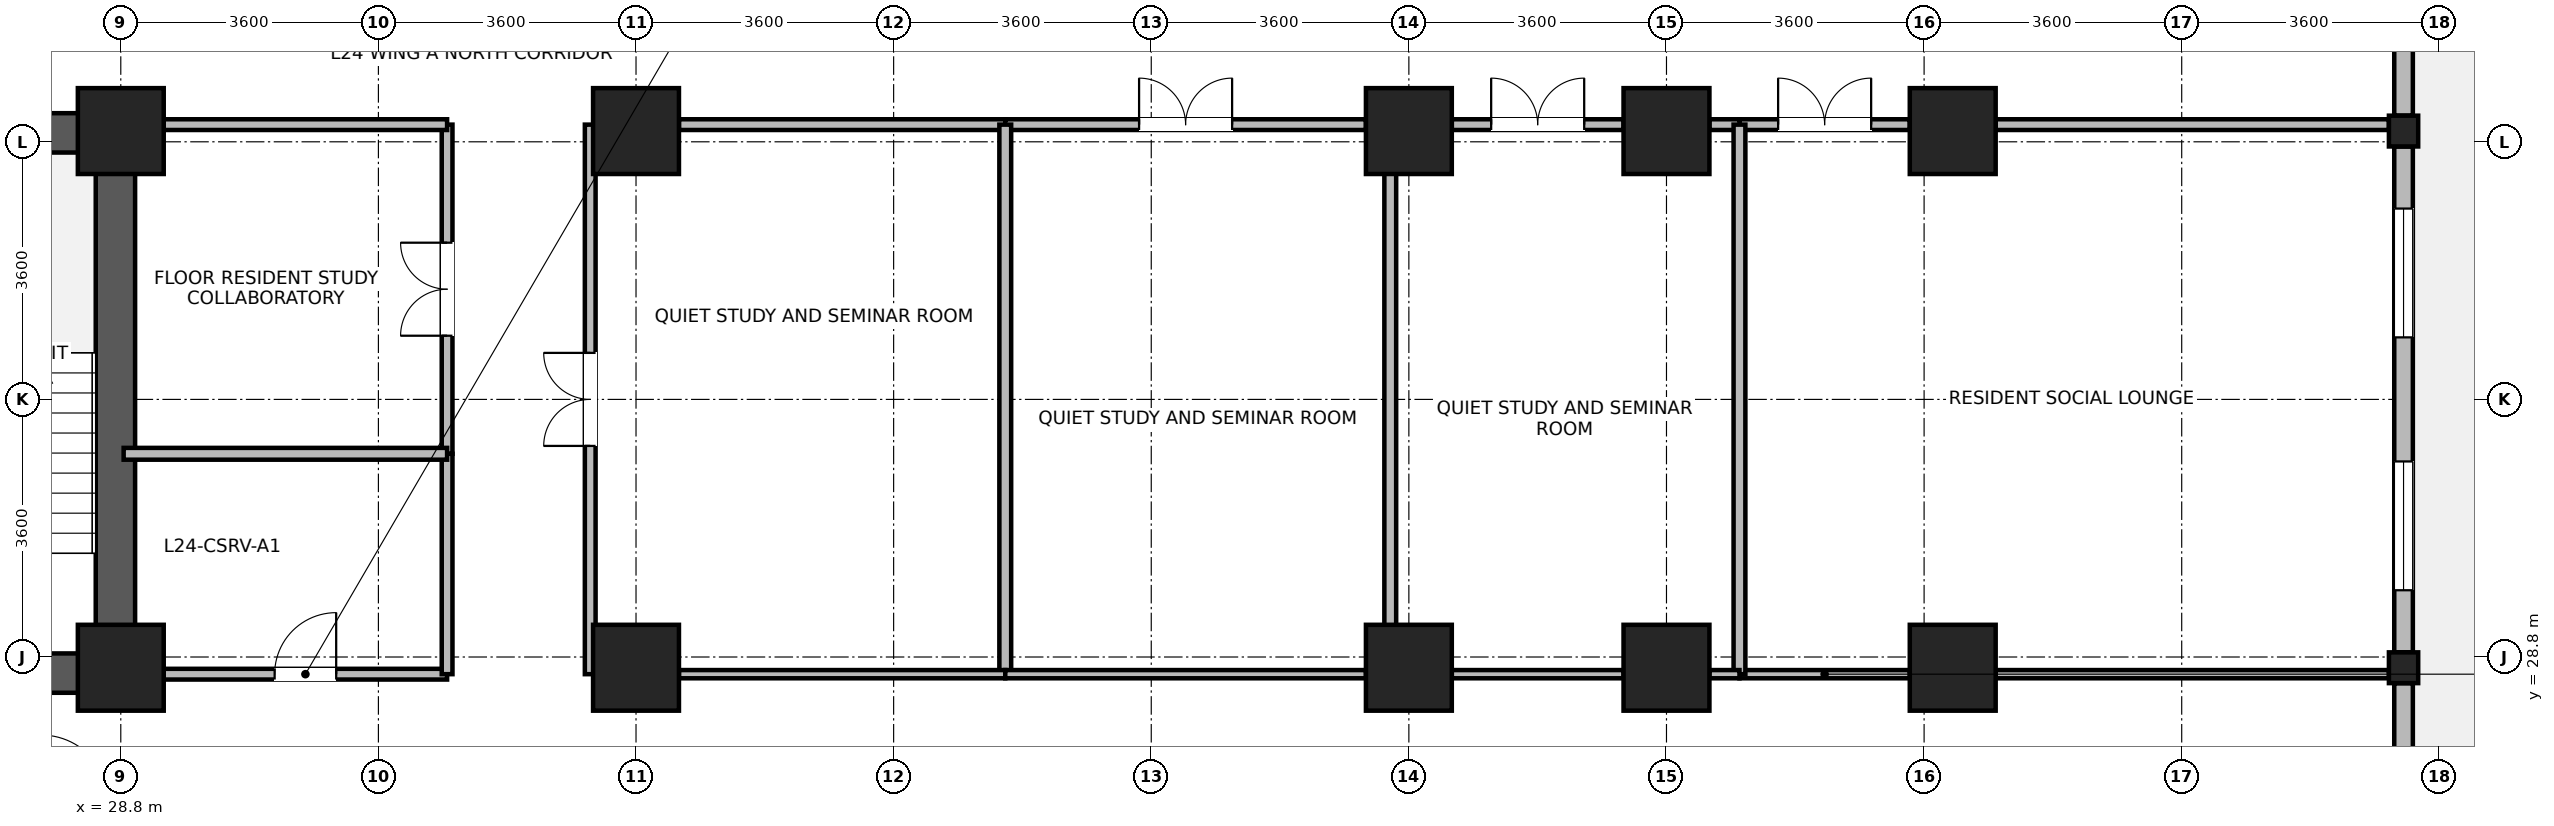
"""IFC4 building model, lengths in metres.
Left out: names, types, materials, properties, quantities, classifications, styles, units other than length and angle.
Written with IfcOpenShell. Run it as: python <this file> out.ifc"""

import sys

from ifc_helpers import new_model, si_unit, direction, frame, frame_2d, origin, origin_2d, place, context, subcontext, project, spatial, rectangle, i_section, extrude, source, transform, mapped, element, fill, save


model = new_model("IFC4")
c1 = context("Model", 3, precision=1e-05, world=origin(), true_north=direction((0.0, 1.0)))
c2 = subcontext(c1, "Body", "Model", "MODEL_VIEW")
j1 = project(units=[si_unit("LENGTHUNIT", "METRE"), si_unit("PLANEANGLEUNIT", "RADIAN")], contexts=[c1])
p1 = place(None, origin())
s1 = spatial("IfcSite", under=j1, at=p1, CompositionType="ELEMENT")
p2 = place(p1, origin())
s2 = spatial("IfcBuilding", under=s1, at=p2, CompositionType="ELEMENT")
p3 = place(p2, frame((0.0, 0.0, 97.1)))
s3 = spatial("IfcBuildingStorey", under=s2, at=p3, CompositionType="ELEMENT", Elevation=97.1)
p4 = place(p3, frame((28.725, 28.3, 0.0), z_axis=(0.0, 0.0, 1.0), x_axis=(0.0, 1.0, 0.0)))
e1 = element("IfcWall", 1, at=p4, inside=s3, PredefinedType="SHEAR", context=c2, shape_type="SweptSolid", body=[
    extrude(rectangle(XDim=8.1, YDim=0.55, at=frame_2d((4.05, 0.0))), origin(), (0.0, 0.0, 1.0), 3.45),
])
for number, where, z_axis, x_axis in (
    (2, (25.25, 28.575, 0.0), (0.0, 0.0, 1.0), (1.0, 0.0, 0.0)),
    (3, (25.25, 36.125, 0.0), (0.0, 0.0, 1.0), (1.0, 0.0, 0.0)),
):
    element("IfcWall", number, at=place(p3, frame(where, z_axis=z_axis, x_axis=x_axis)), inside=s3, PredefinedType="SHEAR", context=c2, shape_type="SweptSolid", body=[
        extrude(rectangle(XDim=3.2, YDim=0.55, at=frame_2d((1.6, 0.0))), origin(), (0.0, 0.0, 1.0), 3.45),
    ])
m1 = source(origin(), c2, "Body", "SweptSolid", [
    extrude(rectangle(XDim=1.2, YDim=1.2, at=origin_2d()), origin(), (0.0, 0.0, 1.0), 3.7),
])
for number, where, z_axis, x_axis in (
    (4, (28.8, 28.65, 0.0), (0.0, 0.0, 1.0), (1.0, 0.0, 0.0)),
    (5, (28.8, 36.15, 0.0), (0.0, 0.0, 1.0), (1.0, 0.0, 0.0)),
    (6, (36.0, 28.65, 0.0), (0.0, 0.0, 1.0), (1.0, 0.0, 0.0)),
    (7, (36.0, 36.15, 0.0), (0.0, 0.0, 1.0), (1.0, 0.0, 0.0)),
    (8, (46.8, 28.65, 0.0), (0.0, 0.0, 1.0), (1.0, 0.0, 0.0)),
    (9, (46.8, 36.15, 0.0), (0.0, 0.0, 1.0), (1.0, 0.0, 0.0)),
    (10, (50.4, 28.65, 0.0), (0.0, 0.0, 1.0), (1.0, 0.0, 0.0)),
    (11, (50.4, 36.15, 0.0), (0.0, 0.0, 1.0), (1.0, 0.0, 0.0)),
    (12, (54.4, 28.65, 0.0), (0.0, 0.0, 1.0), (1.0, 0.0, 0.0)),
    (13, (54.4, 36.15, 0.0), (0.0, 0.0, 1.0), (1.0, 0.0, 0.0)),
):
    element("IfcColumn", number, at=place(p3, frame(where, z_axis=z_axis, x_axis=x_axis)), inside=s3, PredefinedType="COLUMN", context=c2, shape_type="MappedRepresentation", body=[
        mapped(m1, transform((0.0, 0.0, 0.0), x_axis=(1.0, 0.0, 0.0), y_axis=(0.0, 1.0, 0.0), z_axis=(0.0, 0.0, 1.0), scale=1.0)),
    ])
m2 = source(origin(), c2, "Body", "SweptSolid", [
    extrude(i_section(OverallWidth=0.409, OverallDepth=0.43, WebThickness=0.024, FlangeThickness=0.033, FilletRadius=0.015, at=origin_2d()), origin(), (0.0, 0.0, 1.0), 3.7),
])
for number, where, z_axis, x_axis in (
    (14, (60.7, 28.65, 0.0), (0.0, 0.0, 1.0), (1.0, 0.0, 0.0)),
    (15, (60.7, 36.15, 0.0), (0.0, 0.0, 1.0), (1.0, 0.0, 0.0)),
):
    element("IfcColumn", number, at=place(p3, frame(where, z_axis=z_axis, x_axis=x_axis)), inside=s3, PredefinedType="COLUMN", context=c2, shape_type="MappedRepresentation", body=[
        mapped(m2, transform((0.0, 0.0, 0.0), x_axis=(1.0, 0.0, 0.0), y_axis=(0.0, 1.0, 0.0), z_axis=(0.0, 0.0, 1.0), scale=1.0)),
    ])
p5 = place(p3, frame((60.7, 28.434, 0.0), z_axis=(0.0, 0.0, 1.0), x_axis=(0.0, -1.0, 0.0)))
e16 = element("IfcWall", 16, at=p5, inside=s3, PredefinedType="STANDARD", context=c2, shape_type="SweptSolid", body=[
    extrude(rectangle(XDim=6.618, YDim=0.26, at=frame_2d((3.309, 0.0))), origin(), (0.0, 0.0, 1.0), 2.98),
])
p6 = place(p5, frame((4.063, 0.0, 0.85)))
e17 = element("IfcOpeningElement", 17, at=p6, cuts=e16, PredefinedType="OPENING", context=c2, shape_type="SweptSolid", body=[
    extrude(rectangle(XDim=1.8, YDim=1.85, at=frame_2d((0.9, 0.925))), frame((0.0, 0.14, 0.0), z_axis=(0.0, -1.0, 0.0), x_axis=(1.0, 0.0, 0.0)), (0.0, 0.0, 1.0), 0.28),
])
p7 = place(p5, frame((2.305, 0.0, 0.85)))
e18 = element("IfcOpeningElement", 18, at=p7, cuts=e16, PredefinedType="OPENING", context=c2, shape_type="SweptSolid", body=[
    extrude(rectangle(XDim=0.95, YDim=1.75, at=frame_2d((0.475, 0.875))), frame((0.0, 0.14, 0.0), z_axis=(0.0, -1.0, 0.0), x_axis=(1.0, 0.0, 0.0)), (0.0, 0.0, 1.0), 0.28),
])
p8 = place(p3, frame((60.7, 35.934, 0.0), z_axis=(0.0, 0.0, 1.0), x_axis=(0.0, -1.0, 0.0)))
e19 = element("IfcWall", 19, at=p8, inside=s3, PredefinedType="STANDARD", context=c2, shape_type="SweptSolid", body=[
    extrude(rectangle(XDim=7.068, YDim=0.26, at=frame_2d((3.534, 0.0))), origin(), (0.0, 0.0, 1.0), 2.98),
])
p9 = place(p8, frame((0.867, 0.0, 0.85)))
e20 = element("IfcOpeningElement", 20, at=p9, cuts=e19, PredefinedType="OPENING", context=c2, shape_type="SweptSolid", body=[
    extrude(rectangle(XDim=1.8, YDim=1.85, at=frame_2d((0.9, 0.925))), frame((0.0, 0.14, 0.0), z_axis=(0.0, -1.0, 0.0), x_axis=(1.0, 0.0, 0.0)), (0.0, 0.0, 1.0), 0.28),
])
p10 = place(p8, frame((4.401, 0.0, 0.85)))
e21 = element("IfcOpeningElement", 21, at=p10, cuts=e19, PredefinedType="OPENING", context=c2, shape_type="SweptSolid", body=[
    extrude(rectangle(XDim=1.8, YDim=1.85, at=frame_2d((0.9, 0.925))), frame((0.0, 0.14, 0.0), z_axis=(0.0, -1.0, 0.0), x_axis=(1.0, 0.0, 0.0)), (0.0, 0.0, 1.0), 0.28),
])
p11 = place(p3, frame((60.7, 43.33, 0.0), z_axis=(0.0, 0.0, 1.0), x_axis=(0.0, -1.0, 0.0)))
e22 = element("IfcWall", 22, at=p11, inside=s3, PredefinedType="STANDARD", context=c2, shape_type="SweptSolid", body=[
    extrude(rectangle(XDim=6.964, YDim=0.26, at=frame_2d((3.482, 0.0))), origin(), (0.0, 0.0, 1.0), 3.43),
])
p12 = place(p11, frame((0.841, 0.0, 0.85)))
e23 = element("IfcOpeningElement", 23, at=p12, cuts=e22, PredefinedType="OPENING", context=c2, shape_type="SweptSolid", body=[
    extrude(rectangle(XDim=1.8, YDim=1.85, at=frame_2d((0.9, 0.925))), frame((0.0, 0.14, 0.0), z_axis=(0.0, -1.0, 0.0), x_axis=(1.0, 0.0, 0.0)), (0.0, 0.0, 1.0), 0.28),
])
p13 = place(p11, frame((3.007, 0.0, 0.85)))
e24 = element("IfcOpeningElement", 24, at=p13, cuts=e22, PredefinedType="OPENING", context=c2, shape_type="SweptSolid", body=[
    extrude(rectangle(XDim=0.95, YDim=1.75, at=frame_2d((0.475, 0.875))), frame((0.0, 0.14, 0.0), z_axis=(0.0, -1.0, 0.0), x_axis=(1.0, 0.0, 0.0)), (0.0, 0.0, 1.0), 0.28),
])
p14 = place(p3, frame((51.42, 36.24, 0.0), z_axis=(0.0, 0.0, 1.0), x_axis=(1.0, 0.0, 0.0)))
e25 = element("IfcWall", 25, at=p14, inside=s3, PredefinedType="PARTITIONING", context=c2, shape_type="SweptSolid", body=[
    extrude(rectangle(XDim=2.38, YDim=0.15, at=frame_2d((1.19, 0.0))), origin(), (0.0, 0.0, 1.0), 2.78),
])
p15 = place(p14, frame((0.54, 0.0, 0.0)))
e26 = element("IfcOpeningElement", 26, at=p15, cuts=e25, PredefinedType="OPENING", context=c2, shape_type="SweptSolid", body=[
    extrude(rectangle(XDim=1.3, YDim=2.12, at=frame_2d((0.65, 1.06))), frame((0.0, 0.085, 0.0), z_axis=(0.0, -1.0, 0.0), x_axis=(1.0, 0.0, 0.0)), (0.0, 0.0, 1.0), 0.17),
])
p16 = place(p3, frame((55.0, 36.24, 0.0), z_axis=(0.0, 0.0, 1.0), x_axis=(1.0, 0.0, 0.0)))
e27 = element("IfcWall", 27, at=p16, inside=s3, PredefinedType="PARTITIONING", context=c2, shape_type="SweptSolid", body=[
    extrude(rectangle(XDim=5.496, YDim=0.15, at=frame_2d((2.748, 0.0))), origin(), (0.0, 0.0, 1.0), 2.78),
])
p17 = place(p3, frame((35.36, 28.56, 0.0), z_axis=(0.0, 0.0, 1.0), x_axis=(0.0, 1.0, 0.0)))
e28 = element("IfcWall", 28, at=p17, inside=s3, PredefinedType="PARTITIONING", context=c2, shape_type="SweptSolid", body=[
    extrude(rectangle(XDim=7.68, YDim=0.15, at=frame_2d((3.84, 0.0))), origin(), (0.0, 0.0, 1.0), 3.43),
])
p18 = place(p17, frame((3.19, 0.0, 0.0)))
e29 = element("IfcOpeningElement", 29, at=p18, cuts=e28, PredefinedType="OPENING", context=c2, shape_type="SweptSolid", body=[
    extrude(rectangle(XDim=1.3, YDim=2.12, at=frame_2d((0.65, 1.06))), frame((0.0, 0.085, 0.0), z_axis=(0.0, -1.0, 0.0), x_axis=(1.0, 0.0, 0.0)), (0.0, 0.0, 1.0), 0.17),
])
p19 = place(p3, frame((36.6, 36.24, 0.0), z_axis=(0.0, 0.0, 1.0), x_axis=(1.0, 0.0, 0.0)))
e30 = element("IfcWall", 30, at=p19, inside=s3, PredefinedType="PARTITIONING", context=c2, shape_type="SweptSolid", body=[
    extrude(rectangle(XDim=4.56, YDim=0.15, at=frame_2d((2.28, 0.0))), origin(), (0.0, 0.0, 1.0), 2.78),
])
p20 = place(p3, frame((41.16, 36.24, 0.0), z_axis=(0.0, 0.0, 1.0), x_axis=(1.0, 0.0, 0.0)))
e31 = element("IfcWall", 31, at=p20, inside=s3, PredefinedType="PARTITIONING", context=c2, shape_type="SweptSolid", body=[
    extrude(rectangle(XDim=5.04, YDim=0.15, at=frame_2d((2.52, 0.0))), origin(), (0.0, 0.0, 1.0), 2.78),
])
p21 = place(p20, frame((1.87, 0.0, 0.0)))
e32 = element("IfcOpeningElement", 32, at=p21, cuts=e31, PredefinedType="OPENING", context=c2, shape_type="SweptSolid", body=[
    extrude(rectangle(XDim=1.3, YDim=2.12, at=frame_2d((0.65, 1.06))), frame((0.0, 0.085, 0.0), z_axis=(0.0, -1.0, 0.0), x_axis=(1.0, 0.0, 0.0)), (0.0, 0.0, 1.0), 0.17),
])
p22 = place(p3, frame((47.4, 36.24, 0.0), z_axis=(0.0, 0.0, 1.0), x_axis=(1.0, 0.0, 0.0)))
e33 = element("IfcWall", 33, at=p22, inside=s3, PredefinedType="PARTITIONING", context=c2, shape_type="SweptSolid", body=[
    extrude(rectangle(XDim=2.4, YDim=0.15, at=frame_2d((1.2, 0.0))), origin(), (0.0, 0.0, 1.0), 2.78),
])
p23 = place(p22, frame((0.55, 0.0, 0.0)))
e34 = element("IfcOpeningElement", 34, at=p23, cuts=e33, PredefinedType="OPENING", context=c2, shape_type="SweptSolid", body=[
    extrude(rectangle(XDim=1.3, YDim=2.12, at=frame_2d((0.65, 1.06))), frame((0.0, 0.085, 0.0), z_axis=(0.0, -1.0, 0.0), x_axis=(1.0, 0.0, 0.0)), (0.0, 0.0, 1.0), 0.17),
])
p24 = place(p3, frame((51.0, 36.24, 0.0), z_axis=(0.0, 0.0, 1.0), x_axis=(1.0, 0.0, 0.0)))
e35 = element("IfcWall", 35, at=p24, inside=s3, PredefinedType="PARTITIONING", context=c2, shape_type="SweptSolid", body=[
    extrude(rectangle(XDim=0.42, YDim=0.15, at=frame_2d((0.21, 0.0))), origin(), (0.0, 0.0, 1.0), 2.78),
])
p25 = place(p3, frame((33.36, 31.64, 0.0), z_axis=(0.0, 0.0, 1.0), x_axis=(0.0, 1.0, 0.0)))
e36 = element("IfcWall", 36, at=p25, inside=s3, PredefinedType="PARTITIONING", context=c2, shape_type="SweptSolid", body=[
    extrude(rectangle(XDim=4.6, YDim=0.15, at=frame_2d((2.3, 0.0))), origin(), (0.0, 0.0, 1.0), 3.43),
])
p26 = place(p25, frame((1.65, 0.0, 0.0)))
e37 = element("IfcOpeningElement", 37, at=p26, cuts=e36, PredefinedType="OPENING", context=c2, shape_type="SweptSolid", body=[
    extrude(rectangle(XDim=1.3, YDim=2.12, at=frame_2d((0.65, 1.06))), frame((0.0, 0.085, 0.0), z_axis=(0.0, -1.0, 0.0), x_axis=(1.0, 0.0, 0.0)), (0.0, 0.0, 1.0), 0.17),
])
p27 = place(p3, frame((29.4, 28.56, 0.0), z_axis=(0.0, 0.0, 1.0), x_axis=(1.0, 0.0, 0.0)))
e38 = element("IfcWall", 38, at=p27, inside=s3, PredefinedType="PARTITIONING", context=c2, shape_type="SweptSolid", body=[
    extrude(rectangle(XDim=3.96, YDim=0.15, at=frame_2d((1.98, 0.0))), origin(), (0.0, 0.0, 1.0), 2.78),
])
p28 = place(p27, frame((1.55, 0.0, 0.0)))
e39 = element("IfcOpeningElement", 39, at=p28, cuts=e38, PredefinedType="OPENING", context=c2, shape_type="SweptSolid", body=[
    extrude(rectangle(XDim=0.86, YDim=2.02, at=frame_2d((0.43, 1.01))), frame((0.0, 0.085, 0.0), z_axis=(0.0, -1.0, 0.0), x_axis=(1.0, 0.0, 0.0)), (0.0, 0.0, 1.0), 0.17),
])
p29 = place(p3, frame((29.4, 36.24, 0.0), z_axis=(0.0, 0.0, 1.0), x_axis=(1.0, 0.0, 0.0)))
e40 = element("IfcWall", 40, at=p29, inside=s3, PredefinedType="PARTITIONING", context=c2, shape_type="SweptSolid", body=[
    extrude(rectangle(XDim=3.96, YDim=0.15, at=frame_2d((1.98, 0.0))), origin(), (0.0, 0.0, 1.0), 2.78),
])
p30 = place(p3, frame((33.36, 28.56, 0.0), z_axis=(0.0, 0.0, 1.0), x_axis=(0.0, 1.0, 0.0)))
e41 = element("IfcWall", 41, at=p30, inside=s3, PredefinedType="PARTITIONING", context=c2, shape_type="SweptSolid", body=[
    extrude(rectangle(XDim=3.08, YDim=0.15, at=frame_2d((1.54, 0.0))), origin(), (0.0, 0.0, 1.0), 3.43),
])
p31 = place(p3, frame((51.42, 28.56, 0.0), z_axis=(0.0, 0.0, 1.0), x_axis=(1.0, 0.0, 0.0)))
e42 = element("IfcWall", 42, at=p31, inside=s3, PredefinedType="PARTITIONING", context=c2, shape_type="SweptSolid", body=[
    extrude(rectangle(XDim=2.38, YDim=0.115, at=frame_2d((1.19, 0.0))), origin(), (0.0, 0.0, 1.0), 2.78),
])
p32 = place(p3, frame((55.0, 28.56, 0.0), z_axis=(0.0, 0.0, 1.0), x_axis=(1.0, 0.0, 0.0)))
e43 = element("IfcWall", 43, at=p32, inside=s3, PredefinedType="PARTITIONING", context=c2, shape_type="SweptSolid", body=[
    extrude(rectangle(XDim=5.496, YDim=0.115, at=frame_2d((2.748, 0.0))), origin(), (0.0, 0.0, 1.0), 2.78),
])
for number, where, z_axis, x_axis in (
    (44, (41.16, 28.56, 0.0), (0.0, 0.0, 1.0), (0.0, 1.0, 0.0)),
    (45, (46.54, 28.56, 0.0), (0.0, 0.0, 1.0), (0.0, 1.0, 0.0)),
    (46, (51.42, 28.56, 0.0), (0.0, 0.0, 1.0), (0.0, 1.0, 0.0)),
):
    element("IfcWall", number, at=place(p3, frame(where, z_axis=z_axis, x_axis=x_axis)), inside=s3, PredefinedType="PARTITIONING", context=c2, shape_type="SweptSolid", body=[
        extrude(rectangle(XDim=7.68, YDim=0.165, at=frame_2d((3.84, 0.0))), origin(), (0.0, 0.0, 1.0), 3.43),
    ])
p33 = place(p3, frame((36.6, 28.56, 0.0), z_axis=(0.0, 0.0, 1.0), x_axis=(1.0, 0.0, 0.0)))
e47 = element("IfcWall", 47, at=p33, inside=s3, PredefinedType="PARTITIONING", context=c2, shape_type="SweptSolid", body=[
    extrude(rectangle(XDim=4.56, YDim=0.115, at=frame_2d((2.28, 0.0))), origin(), (0.0, 0.0, 1.0), 2.78),
])
p34 = place(p3, frame((41.16, 28.56, 0.0), z_axis=(0.0, 0.0, 1.0), x_axis=(1.0, 0.0, 0.0)))
e48 = element("IfcWall", 48, at=p34, inside=s3, PredefinedType="PARTITIONING", context=c2, shape_type="SweptSolid", body=[
    extrude(rectangle(XDim=5.04, YDim=0.115, at=frame_2d((2.52, 0.0))), origin(), (0.0, 0.0, 1.0), 2.78),
])
p35 = place(p3, frame((47.4, 28.56, 0.0), z_axis=(0.0, 0.0, 1.0), x_axis=(1.0, 0.0, 0.0)))
e49 = element("IfcWall", 49, at=p35, inside=s3, PredefinedType="PARTITIONING", context=c2, shape_type="SweptSolid", body=[
    extrude(rectangle(XDim=2.4, YDim=0.115, at=frame_2d((1.2, 0.0))), origin(), (0.0, 0.0, 1.0), 2.78),
])
p36 = place(p3, frame((51.0, 28.56, 0.0), z_axis=(0.0, 0.0, 1.0), x_axis=(1.0, 0.0, 0.0)))
e50 = element("IfcWall", 50, at=p36, inside=s3, PredefinedType="PARTITIONING", context=c2, shape_type="SweptSolid", body=[
    extrude(rectangle(XDim=0.42, YDim=0.115, at=frame_2d((0.21, 0.0))), origin(), (0.0, 0.0, 1.0), 2.78),
])
p37 = place(p3, frame((28.84, 31.64, 0.0), z_axis=(0.0, 0.0, 1.0), x_axis=(1.0, 0.0, 0.0)))
e51 = element("IfcWall", 51, at=p37, inside=s3, PredefinedType="PARTITIONING", context=c2, shape_type="SweptSolid", body=[
    extrude(rectangle(XDim=4.52, YDim=0.165, at=frame_2d((2.26, 0.0))), origin(), (0.0, 0.0, 1.0), 3.43),
])
p38 = place(p9, origin())
e52 = element("IfcWindow", 52, at=p38, inside=s3, PartitioningType="SINGLE_PANEL", PredefinedType="WINDOW", context=c2, shape_type="SweptSolid", body=[
    extrude(rectangle(XDim=1.8, YDim=1.85, at=frame_2d((0.9, 0.925))), frame((0.0, 0.03, 0.0), z_axis=(0.0, -1.0, 0.0), x_axis=(1.0, 0.0, 0.0)), (0.0, 0.0, 1.0), 0.06),
])
fill(e20, e52)
p39 = place(p10, origin())
e53 = element("IfcWindow", 53, at=p39, inside=s3, PartitioningType="SINGLE_PANEL", PredefinedType="WINDOW", context=c2, shape_type="SweptSolid", body=[
    extrude(rectangle(XDim=1.8, YDim=1.85, at=frame_2d((0.9, 0.925))), frame((0.0, 0.03, 0.0), z_axis=(0.0, -1.0, 0.0), x_axis=(1.0, 0.0, 0.0)), (0.0, 0.0, 1.0), 0.06),
])
fill(e21, e53)
p40 = place(p15, origin())
e54 = element("IfcDoor", 54, at=p40, inside=s3, OperationType="DOUBLE_DOOR_SINGLE_SWING", PredefinedType="DOOR", context=c2, shape_type="SweptSolid", body=[
    extrude(rectangle(XDim=1.3, YDim=2.12, at=frame_2d((0.65, 1.06))), frame((0.0, 0.025, 0.0), z_axis=(0.0, -1.0, 0.0), x_axis=(1.0, 0.0, 0.0)), (0.0, 0.0, 1.0), 0.05),
])
fill(e26, e54)
p41 = place(p18, origin())
e55 = element("IfcDoor", 55, at=p41, inside=s3, OperationType="DOUBLE_DOOR_SINGLE_SWING", PredefinedType="DOOR", context=c2, shape_type="SweptSolid", body=[
    extrude(rectangle(XDim=1.3, YDim=2.12, at=frame_2d((0.65, 1.06))), frame((0.0, 0.025, 0.0), z_axis=(0.0, -1.0, 0.0), x_axis=(1.0, 0.0, 0.0)), (0.0, 0.0, 1.0), 0.05),
])
fill(e29, e55)
p42 = place(p21, origin())
e56 = element("IfcDoor", 56, at=p42, inside=s3, OperationType="DOUBLE_DOOR_SINGLE_SWING", PredefinedType="DOOR", context=c2, shape_type="SweptSolid", body=[
    extrude(rectangle(XDim=1.3, YDim=2.12, at=frame_2d((0.65, 1.06))), frame((0.0, 0.025, 0.0), z_axis=(0.0, -1.0, 0.0), x_axis=(1.0, 0.0, 0.0)), (0.0, 0.0, 1.0), 0.05),
])
fill(e32, e56)
p43 = place(p23, origin())
e57 = element("IfcDoor", 57, at=p43, inside=s3, OperationType="DOUBLE_DOOR_SINGLE_SWING", PredefinedType="DOOR", context=c2, shape_type="SweptSolid", body=[
    extrude(rectangle(XDim=1.3, YDim=2.12, at=frame_2d((0.65, 1.06))), frame((0.0, 0.025, 0.0), z_axis=(0.0, -1.0, 0.0), x_axis=(1.0, 0.0, 0.0)), (0.0, 0.0, 1.0), 0.05),
])
fill(e34, e57)
p44 = place(p26, origin())
e58 = element("IfcDoor", 58, at=p44, inside=s3, OperationType="DOUBLE_DOOR_SINGLE_SWING", PredefinedType="DOOR", context=c2, shape_type="SweptSolid", body=[
    extrude(rectangle(XDim=1.3, YDim=2.12, at=frame_2d((0.65, 1.06))), frame((0.0, 0.025, 0.0), z_axis=(0.0, -1.0, 0.0), x_axis=(1.0, 0.0, 0.0)), (0.0, 0.0, 1.0), 0.05),
])
fill(e37, e58)
p45 = place(p28, origin())
e59 = element("IfcDoor", 59, at=p45, inside=s3, OperationType="SINGLE_SWING_RIGHT", PredefinedType="DOOR", context=c2, shape_type="SweptSolid", body=[
    extrude(rectangle(XDim=0.86, YDim=2.02, at=frame_2d((0.43, 1.01))), frame((0.0, 0.025, 0.0), z_axis=(0.0, -1.0, 0.0), x_axis=(1.0, 0.0, 0.0)), (0.0, 0.0, 1.0), 0.05),
])
fill(e39, e59)
save(model, sys.argv[1])
